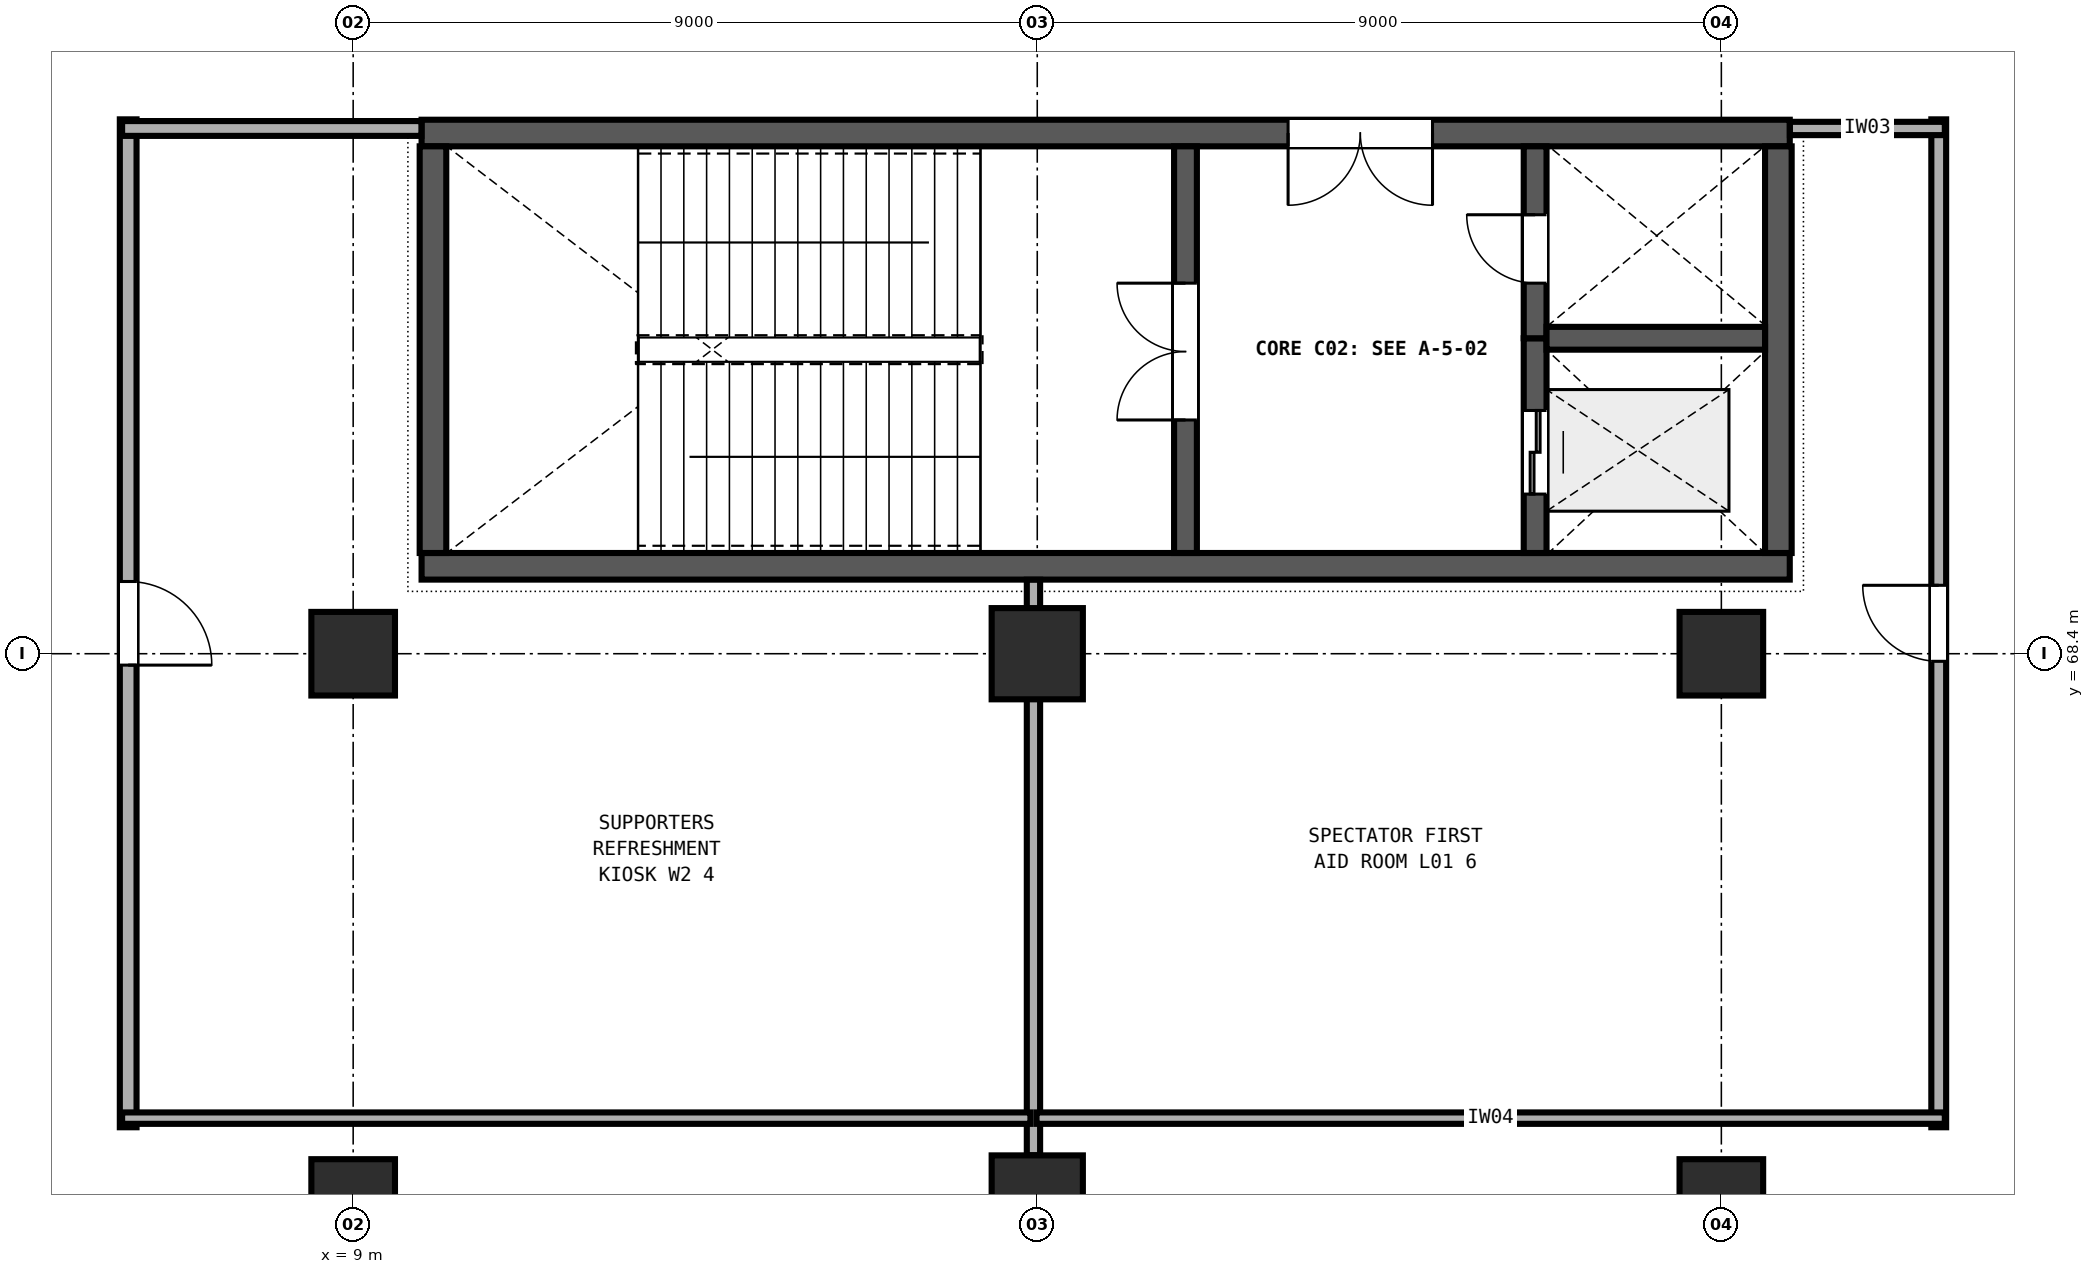
"""IFC4 building model, lengths in metres.
Left out: names, types, materials, properties, quantities, classifications, styles, units other than length and angle.
Written with IfcOpenShell. Run it as: python <this file> out.ifc"""

import sys

from ifc_helpers import new_model, si_unit, direction, frame, frame_2d, origin, origin_2d, place, context, subcontext, project, spatial, rectangle, extrude, element, fill, save


model = new_model("IFC4")
c1 = context("Model", 3, precision=1e-05, world=origin(), true_north=direction((0.0, 1.0)))
c2 = subcontext(c1, "Body", "Model", "MODEL_VIEW")
j1 = project(units=[si_unit("LENGTHUNIT", "METRE"), si_unit("PLANEANGLEUNIT", "RADIAN")], contexts=[c1])
p1 = place(None, origin())
s1 = spatial("IfcSite", under=j1, at=p1, CompositionType="ELEMENT")
p2 = place(p1, origin())
s2 = spatial("IfcBuilding", under=s1, at=p2, CompositionType="ELEMENT")
p3 = place(p2, frame((0.0, 0.0, 4.8)))
s3 = spatial("IfcBuildingStorey", under=s2, at=p3, CompositionType="ELEMENT", Elevation=4.8)
for number, where, z_axis, x_axis in (
    (1, (9.0, 61.2, 0.0), (0.0, 0.0, 1.0), (1.0, 0.0, 0.0)),
    (2, (9.0, 68.4, 0.0), (0.0, 0.0, 1.0), (1.0, 0.0, 0.0)),
):
    element("IfcColumn", number, at=place(p3, frame(where, z_axis=z_axis, x_axis=x_axis)), inside=s3, PredefinedType="COLUMN", context=c2, shape_type="SweptSolid", body=[
        extrude(rectangle(XDim=1.1, YDim=1.1, at=origin_2d()), origin(), (0.0, 0.0, 1.0), 4.8),
    ])
for number, where, z_axis, x_axis in (
    (3, (18.0, 61.2, 0.0), (0.0, 0.0, 1.0), (1.0, 0.0, 0.0)),
    (4, (18.0, 68.4, 0.0), (0.0, 0.0, 1.0), (1.0, 0.0, 0.0)),
):
    element("IfcColumn", number, at=place(p3, frame(where, z_axis=z_axis, x_axis=x_axis)), inside=s3, PredefinedType="COLUMN", context=c2, shape_type="SweptSolid", body=[
        extrude(rectangle(XDim=1.2, YDim=1.2, at=origin_2d()), origin(), (0.0, 0.0, 1.0), 4.8),
    ])
for number, where, z_axis, x_axis in (
    (5, (27.0, 61.2, 0.0), (0.0, 0.0, 1.0), (1.0, 0.0, 0.0)),
    (6, (27.0, 68.4, 0.0), (0.0, 0.0, 1.0), (1.0, 0.0, 0.0)),
):
    element("IfcColumn", number, at=place(p3, frame(where, z_axis=z_axis, x_axis=x_axis)), inside=s3, PredefinedType="COLUMN", context=c2, shape_type="SweptSolid", body=[
        extrude(rectangle(XDim=1.1, YDim=1.1, at=origin_2d()), origin(), (0.0, 0.0, 1.0), 4.8),
    ])
p4 = place(p3, frame((9.9, 69.55, 0.0), z_axis=(0.0, 0.0, 1.0), x_axis=(1.0, 0.0, 0.0)))
e7 = element("IfcWall", 7, at=p4, inside=s3, PredefinedType="SHEAR", context=c2, shape_type="SweptSolid", body=[
    extrude(rectangle(XDim=18.0, YDim=0.35, at=frame_2d((9.0, 0.0))), origin(), (0.0, 0.0, 1.0), 4.52),
])
p5 = place(p3, frame((27.9, 75.25, 0.0), z_axis=(0.0, 0.0, 1.0), x_axis=(-1.0, 0.0, 0.0)))
e8 = element("IfcWall", 8, at=p5, inside=s3, PredefinedType="SHEAR", context=c2, shape_type="SweptSolid", body=[
    extrude(rectangle(XDim=18.0, YDim=0.35, at=frame_2d((9.0, 0.0))), origin(), (0.0, 0.0, 1.0), 4.52),
])
p6 = place(p5, frame((4.7, 0.0, 0.0)))
e9 = element("IfcOpeningElement", 9, at=p6, cuts=e8, PredefinedType="OPENING", context=c2, shape_type="SweptSolid", body=[
    extrude(rectangle(XDim=1.9, YDim=2.25, at=frame_2d((0.95, 1.125))), frame((0.0, 0.185, 0.0), z_axis=(0.0, -1.0, 0.0), x_axis=(1.0, 0.0, 0.0)), (0.0, 0.0, 1.0), 0.37),
])
for number, where, z_axis, x_axis in (
    (10, (10.05, 75.075, 0.0), (0.0, 0.0, 1.0), (0.0, -1.0, 0.0)),
    (11, (27.75, 69.725, 0.0), (0.0, 0.0, 1.0), (0.0, 1.0, 0.0)),
):
    element("IfcWall", number, at=place(p3, frame(where, z_axis=z_axis, x_axis=x_axis)), inside=s3, PredefinedType="SHEAR", context=c2, shape_type="SweptSolid", body=[
        extrude(rectangle(XDim=5.35, YDim=0.35, at=frame_2d((2.675, 0.0))), origin(), (0.0, 0.0, 1.0), 4.52),
    ])
p7 = place(p3, frame((19.95, 69.725, 0.0), z_axis=(0.0, 0.0, 1.0), x_axis=(0.0, 1.0, 0.0)))
e12 = element("IfcWall", 12, at=p7, inside=s3, PredefinedType="SHEAR", context=c2, shape_type="SweptSolid", body=[
    extrude(rectangle(XDim=5.35, YDim=0.3, at=frame_2d((2.675, 0.0))), origin(), (0.0, 0.0, 1.0), 4.52),
])
p8 = place(p7, frame((1.75, 0.0, 0.0)))
e13 = element("IfcOpeningElement", 13, at=p8, cuts=e12, PredefinedType="OPENING", context=c2, shape_type="SweptSolid", body=[
    extrude(rectangle(XDim=1.8, YDim=2.25, at=frame_2d((0.9, 1.125))), frame((0.0, 0.16, 0.0), z_axis=(0.0, -1.0, 0.0), x_axis=(1.0, 0.0, 0.0)), (0.0, 0.0, 1.0), 0.32),
])
p9 = place(p3, frame((24.55, 69.725, 0.0), z_axis=(0.0, 0.0, 1.0), x_axis=(0.0, 1.0, 0.0)))
e14 = element("IfcWall", 14, at=p9, inside=s3, PredefinedType="SHEAR", context=c2, shape_type="SweptSolid", body=[
    extrude(rectangle(XDim=2.825, YDim=0.3, at=frame_2d((1.413, 0.0))), origin(), (0.0, 0.0, 1.0), 4.52),
])
p10 = place(p9, frame((0.775, 0.0, 0.0)))
e15 = element("IfcOpeningElement", 15, at=p10, cuts=e14, PredefinedType="OPENING", context=c2, shape_type="SweptSolid", body=[
    extrude(rectangle(XDim=1.1, YDim=2.1, at=frame_2d((0.55, 1.05))), frame((0.0, 0.16, 0.0), z_axis=(0.0, -1.0, 0.0), x_axis=(1.0, 0.0, 0.0)), (0.0, 0.0, 1.0), 0.32),
])
p11 = place(p3, frame((24.55, 72.55, 0.0), z_axis=(0.0, 0.0, 1.0), x_axis=(0.0, 1.0, 0.0)))
e16 = element("IfcWall", 16, at=p11, inside=s3, PredefinedType="SHEAR", context=c2, shape_type="SweptSolid", body=[
    extrude(rectangle(XDim=2.525, YDim=0.3, at=frame_2d((1.262, 0.0))), origin(), (0.0, 0.0, 1.0), 4.52),
])
p12 = place(p11, frame((0.725, 0.0, 0.0)))
e17 = element("IfcOpeningElement", 17, at=p12, cuts=e16, PredefinedType="OPENING", context=c2, shape_type="SweptSolid", body=[
    extrude(rectangle(XDim=0.9, YDim=2.1, at=frame_2d((0.45, 1.05))), frame((0.0, 0.16, 0.0), z_axis=(0.0, -1.0, 0.0), x_axis=(1.0, 0.0, 0.0)), (0.0, 0.0, 1.0), 0.32),
])
p13 = place(p3, frame((24.7, 72.55, 0.0), z_axis=(0.0, 0.0, 1.0), x_axis=(1.0, 0.0, 0.0)))
e18 = element("IfcWall", 18, at=p13, inside=s3, PredefinedType="SHEAR", context=c2, shape_type="SweptSolid", body=[
    extrude(rectangle(XDim=2.875, YDim=0.3, at=frame_2d((1.438, 0.0))), origin(), (0.0, 0.0, 1.0), 4.52),
])
p14 = place(p3, frame((6.04, 75.43, 0.0), z_axis=(0.0, 0.0, 1.0), x_axis=(0.0, -1.0, 0.0)))
e19 = element("IfcWall", 19, at=p14, inside=s3, PredefinedType="PARTITIONING", context=c2, shape_type="SweptSolid", body=[
    extrude(rectangle(XDim=13.26, YDim=0.22, at=frame_2d((6.63, 0.0))), origin(), (0.0, 0.0, 1.0), 3.28),
])
p15 = place(p14, frame((6.08, 0.0, 0.0)))
e20 = element("IfcOpeningElement", 20, at=p15, cuts=e19, PredefinedType="OPENING", context=c2, shape_type="SweptSolid", body=[
    extrude(rectangle(XDim=1.1, YDim=2.1, at=frame_2d((0.55, 1.05))), frame((0.0, 0.12, 0.0), z_axis=(0.0, -1.0, 0.0), x_axis=(1.0, 0.0, 0.0)), (0.0, 0.0, 1.0), 0.24),
])
p16 = place(p3, frame((5.96, 75.31, 0.0), z_axis=(0.0, 0.0, 1.0), x_axis=(1.0, 0.0, 0.0)))
e21 = element("IfcWall", 21, at=p16, inside=s3, PredefinedType="PARTITIONING", context=c2, shape_type="SweptSolid", body=[
    extrude(rectangle(XDim=3.938, YDim=0.195, at=frame_2d((1.969, 0.0))), origin(), (0.0, 0.0, 1.0), 3.28),
])
p17 = place(p3, frame((17.95, 69.373, 0.0), z_axis=(0.0, 0.0, 1.0), x_axis=(0.0, -1.0, 0.0)))
e22 = element("IfcWall", 22, at=p17, inside=s3, PredefinedType="PARTITIONING", context=c2, shape_type="SweptSolid", body=[
    extrude(rectangle(XDim=7.571, YDim=0.175, at=frame_2d((3.786, 0.0))), origin(), (0.0, 0.0, 1.0), 3.28),
])
p18 = place(p3, frame((17.91, 62.29, 0.0), z_axis=(0.0, 0.0, 1.0), x_axis=(-1.0, 0.0, 0.0)))
e23 = element("IfcWall", 23, at=p18, inside=s3, PredefinedType="PARTITIONING", context=c2, shape_type="SweptSolid", body=[
    extrude(rectangle(XDim=11.95, YDim=0.15, at=frame_2d((5.975, 0.0))), origin(), (0.0, 0.0, 1.0), 3.28),
])
p19 = place(p3, frame((29.86, 62.17, 0.0), z_axis=(0.0, 0.0, 1.0), x_axis=(0.0, 1.0, 0.0)))
e24 = element("IfcWall", 24, at=p19, inside=s3, PredefinedType="PARTITIONING", context=c2, shape_type="SweptSolid", body=[
    extrude(rectangle(XDim=13.26, YDim=0.195, at=frame_2d((6.63, 0.0))), origin(), (0.0, 0.0, 1.0), 3.28),
])
p20 = place(p19, frame((6.13, 0.0, 0.0)))
e25 = element("IfcOpeningElement", 25, at=p20, cuts=e24, PredefinedType="OPENING", context=c2, shape_type="SweptSolid", body=[
    extrude(rectangle(XDim=1.0, YDim=2.1, at=frame_2d((0.5, 1.05))), frame((0.0, 0.107, 0.0), z_axis=(0.0, -1.0, 0.0), x_axis=(1.0, 0.0, 0.0)), (0.0, 0.0, 1.0), 0.215),
])
p21 = place(p3, frame((27.902, 75.31, 0.0), z_axis=(0.0, 0.0, 1.0), x_axis=(1.0, 0.0, 0.0)))
e26 = element("IfcWall", 26, at=p21, inside=s3, PredefinedType="PARTITIONING", context=c2, shape_type="SweptSolid", body=[
    extrude(rectangle(XDim=2.038, YDim=0.175, at=frame_2d((1.019, 0.0))), origin(), (0.0, 0.0, 1.0), 3.28),
])
p22 = place(p3, frame((29.94, 62.29, 0.0), z_axis=(0.0, 0.0, 1.0), x_axis=(-1.0, 0.0, 0.0)))
e27 = element("IfcWall", 27, at=p22, inside=s3, PredefinedType="PARTITIONING", context=c2, shape_type="SweptSolid", body=[
    extrude(rectangle(XDim=11.95, YDim=0.15, at=frame_2d((5.975, 0.0))), origin(), (0.0, 0.0, 1.0), 3.28),
])
p23 = place(p8, origin())
e28 = element("IfcDoor", 28, at=p23, inside=s3, OperationType="DOUBLE_DOOR_SINGLE_SWING", PredefinedType="DOOR", context=c2, shape_type="SweptSolid", body=[
    extrude(rectangle(XDim=1.8, YDim=2.25, at=frame_2d((0.9, 1.125))), frame((0.0, 0.025, 0.0), z_axis=(0.0, -1.0, 0.0), x_axis=(1.0, 0.0, 0.0)), (0.0, 0.0, 1.0), 0.05),
])
fill(e13, e28)
p24 = place(p12, origin())
e29 = element("IfcDoor", 29, at=p24, inside=s3, OperationType="SINGLE_SWING_RIGHT", PredefinedType="DOOR", context=c2, shape_type="SweptSolid", body=[
    extrude(rectangle(XDim=0.9, YDim=2.1, at=frame_2d((0.45, 1.05))), frame((0.0, 0.025, 0.0), z_axis=(0.0, -1.0, 0.0), x_axis=(1.0, 0.0, 0.0)), (0.0, 0.0, 1.0), 0.05),
])
fill(e17, e29)
p25 = place(p10, origin())
e30 = element("IfcDoor", 30, at=p25, inside=s3, OperationType="DOUBLE_DOOR_SLIDING", PredefinedType="DOOR", context=c2, shape_type="SweptSolid", body=[
    extrude(rectangle(XDim=1.1, YDim=2.1, at=frame_2d((0.55, 1.05))), frame((0.0, 0.025, 0.0), z_axis=(0.0, -1.0, 0.0), x_axis=(1.0, 0.0, 0.0)), (0.0, 0.0, 1.0), 0.05),
])
fill(e15, e30)
p26 = place(p6, origin())
e31 = element("IfcDoor", 31, at=p26, inside=s3, OperationType="DOUBLE_DOOR_SINGLE_SWING", PredefinedType="DOOR", context=c2, shape_type="SweptSolid", body=[
    extrude(rectangle(XDim=1.9, YDim=2.25, at=frame_2d((0.95, 1.125))), frame((0.0, 0.025, 0.0), z_axis=(0.0, -1.0, 0.0), x_axis=(1.0, 0.0, 0.0)), (0.0, 0.0, 1.0), 0.05),
])
fill(e9, e31)
p27 = place(p15, origin())
e32 = element("IfcDoor", 32, at=p27, inside=s3, OperationType="SINGLE_SWING_RIGHT", PredefinedType="DOOR", context=c2, shape_type="SweptSolid", body=[
    extrude(rectangle(XDim=1.1, YDim=2.1, at=frame_2d((0.55, 1.05))), frame((0.0, 0.025, 0.0), z_axis=(0.0, -1.0, 0.0), x_axis=(1.0, 0.0, 0.0)), (0.0, 0.0, 1.0), 0.05),
])
fill(e20, e32)
p28 = place(p20, origin())
e33 = element("IfcDoor", 33, at=p28, inside=s3, OperationType="SINGLE_SWING_RIGHT", PredefinedType="DOOR", context=c2, shape_type="SweptSolid", body=[
    extrude(rectangle(XDim=1.0, YDim=2.1, at=frame_2d((0.5, 1.05))), frame((0.0, 0.025, 0.0), z_axis=(0.0, -1.0, 0.0), x_axis=(1.0, 0.0, 0.0)), (0.0, 0.0, 1.0), 0.05),
])
fill(e25, e33)
save(model, sys.argv[1])
